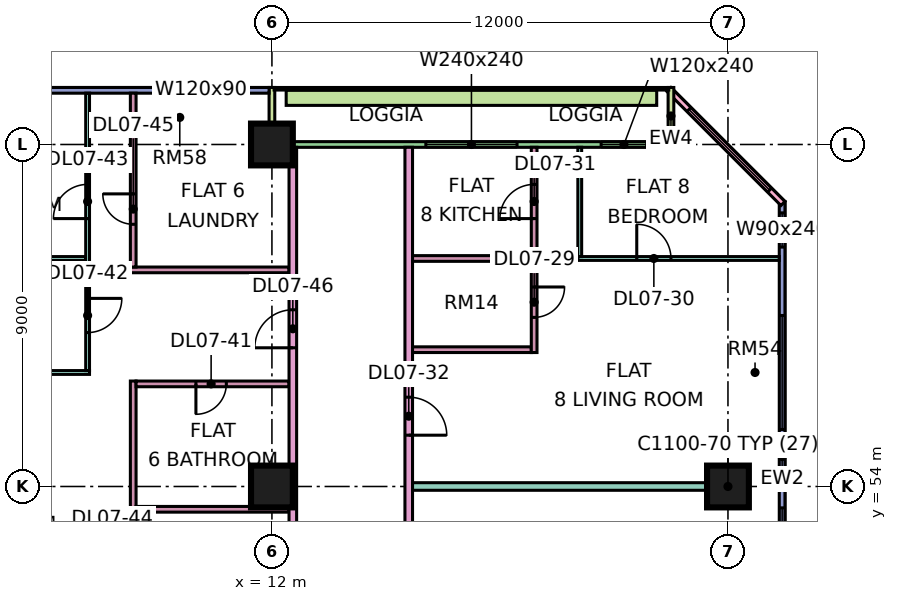
"""IFC4 building model, lengths in metres.
Left out: names, types, materials, properties, quantities, classifications, styles, units other than length and angle.
Written with IfcOpenShell. Run it as: python <this file> out.ifc"""

import sys

from ifc_helpers import new_model, si_unit, direction, frame, frame_2d, origin, origin_2d, place, context, subcontext, project, spatial, rectangle, extrude, element, fill, save


model = new_model("IFC4")
c1 = context("Model", 3, precision=1e-05, world=origin(), true_north=direction((0.0, 1.0)))
c2 = subcontext(c1, "Body", "Model", "MODEL_VIEW")
j1 = project(units=[si_unit("LENGTHUNIT", "METRE"), si_unit("PLANEANGLEUNIT", "RADIAN")], contexts=[c1])
p1 = place(None, origin())
s1 = spatial("IfcSite", under=j1, at=p1, CompositionType="ELEMENT")
p2 = place(p1, origin())
s2 = spatial("IfcBuilding", under=s1, at=p2, CompositionType="ELEMENT")
p3 = place(p2, frame((0.0, 0.0, 41.4)))
s3 = spatial("IfcBuildingStorey", under=s2, at=p3, CompositionType="ELEMENT", Elevation=41.4)
for number, where, z_axis, x_axis in (
    (1, (12.0, 54.0, 0.0), (0.0, 0.0, 1.0), (1.0, 0.0, 0.0)),
    (2, (12.0, 63.0, 0.0), (0.0, 0.0, 1.0), (1.0, 0.0, 0.0)),
    (3, (24.0, 54.0, 0.0), (0.0, 0.0, 1.0), (1.0, 0.0, 0.0)),
):
    element("IfcColumn", number, at=place(p3, frame(where, z_axis=z_axis, x_axis=x_axis)), inside=s3, PredefinedType="COLUMN", context=c2, shape_type="SweptSolid", body=[
        extrude(rectangle(XDim=1.1, YDim=1.1, at=origin_2d()), origin(), (0.0, 0.0, 1.0), 3.75),
    ])
p4 = place(p3, frame((25.425, 48.075, 0.0), z_axis=(0.0, 0.0, 1.0), x_axis=(0.0, 1.0, 0.0)))
e4 = element("IfcWall", 4, at=p4, inside=s3, PredefinedType="SOLIDWALL", context=c2, shape_type="SweptSolid", body=[
    extrude(rectangle(XDim=13.425, YDim=0.15, at=frame_2d((6.712, 0.0))), origin(), (0.0, 0.0, 1.0), 3.35),
])
p5 = place(p4, frame((0.562, 0.0, 0.45)))
e5 = element("IfcOpeningElement", 5, at=p5, cuts=e4, PredefinedType="OPENING", context=c2, shape_type="SweptSolid", body=[
    extrude(rectangle(XDim=4.8, YDim=2.4, at=frame_2d((2.4, 1.2))), frame((0.0, 0.085, 0.0), z_axis=(0.0, -1.0, 0.0), x_axis=(1.0, 0.0, 0.0)), (0.0, 0.0, 1.0), 0.17),
])
p6 = place(p4, frame((7.425, 0.0, 0.45)))
e6 = element("IfcOpeningElement", 6, at=p6, cuts=e4, PredefinedType="OPENING", context=c2, shape_type="SweptSolid", body=[
    extrude(rectangle(XDim=3.0, YDim=2.4, at=frame_2d((1.5, 1.2))), frame((0.0, 0.085, 0.0), z_axis=(0.0, -1.0, 0.0), x_axis=(1.0, 0.0, 0.0)), (0.0, 0.0, 1.0), 0.17),
])
p7 = place(p4, frame((12.225, 0.0, 0.45)))
e7 = element("IfcOpeningElement", 7, at=p7, cuts=e4, PredefinedType="OPENING", context=c2, shape_type="SweptSolid", body=[
    extrude(rectangle(XDim=0.9, YDim=2.4, at=frame_2d((0.45, 1.2))), frame((0.0, 0.085, 0.0), z_axis=(0.0, -1.0, 0.0), x_axis=(1.0, 0.0, 0.0)), (0.0, 0.0, 1.0), 0.17),
])
p8 = place(p3, frame((25.447, 61.447, 0.0), z_axis=(0.0, 0.0, 1.0), x_axis=(-0.707106781187, 0.707106781187, 0.0)))
e8 = element("IfcWall", 8, at=p8, inside=s3, PredefinedType="SOLIDWALL", context=c2, shape_type="SweptSolid", body=[
    extrude(rectangle(XDim=4.243, YDim=0.15, at=frame_2d((2.121, 0.0))), origin(), (0.0, 0.0, 1.0), 3.35),
])
p9 = place(p8, frame((0.498, 0.0, 0.45)))
e9 = element("IfcOpeningElement", 9, at=p9, cuts=e8, PredefinedType="OPENING", context=c2, shape_type="SweptSolid", body=[
    extrude(rectangle(XDim=3.0, YDim=2.4, at=frame_2d((1.5, 1.2))), frame((0.0, 0.085, 0.0), z_axis=(0.0, -1.0, 0.0), x_axis=(1.0, 0.0, 0.0)), (0.0, 0.0, 1.0), 0.17),
])
p10 = place(p3, frame((22.425, 63.0, 0.0), z_axis=(0.0, 0.0, 1.0), x_axis=(-1.0, 0.0, 0.0)))
e10 = element("IfcWall", 10, at=p10, inside=s3, PredefinedType="SOLIDWALL", context=c2, shape_type="SweptSolid", body=[
    extrude(rectangle(XDim=10.35, YDim=0.15, at=frame_2d((5.175, 0.0))), origin(), (0.0, 0.0, 1.0), 3.35),
])
p11 = place(p10, frame((0.562, 0.0, 0.45)))
e11 = element("IfcOpeningElement", 11, at=p11, cuts=e10, PredefinedType="OPENING", context=c2, shape_type="SweptSolid", body=[
    extrude(rectangle(XDim=1.2, YDim=2.4, at=frame_2d((0.6, 1.2))), frame((0.0, 0.085, 0.0), z_axis=(0.0, -1.0, 0.0), x_axis=(1.0, 0.0, 0.0)), (0.0, 0.0, 1.0), 0.17),
])
p12 = place(p10, frame((3.975, 0.0, 0.45)))
e12 = element("IfcOpeningElement", 12, at=p12, cuts=e10, PredefinedType="OPENING", context=c2, shape_type="SweptSolid", body=[
    extrude(rectangle(XDim=2.4, YDim=2.4, at=frame_2d((1.2, 1.2))), frame((0.0, 0.085, 0.0), z_axis=(0.0, -1.0, 0.0), x_axis=(1.0, 0.0, 0.0)), (0.0, 0.0, 1.0), 0.17),
])
for number, where, z_axis, x_axis in (
    (13, (22.5, 64.5, 0.0), (0.0, 0.0, 1.0), (0.0, -1.0, 0.0)),
    (14, (12.0, 64.5, 0.0), (0.0, 0.0, 1.0), (0.0, -1.0, 0.0)),
):
    element("IfcWall", number, at=place(p3, frame(where, z_axis=z_axis, x_axis=x_axis)), inside=s3, PredefinedType="SOLIDWALL", context=c2, shape_type="SweptSolid", body=[
        extrude(rectangle(XDim=1.5, YDim=0.15, at=frame_2d((0.75, 0.0))), origin(), (0.0, 0.0, 1.0), 3.35),
    ])
p13 = place(p3, frame((11.925, 64.425, 0.0), z_axis=(0.0, 0.0, 1.0), x_axis=(-1.0, 0.0, 0.0)))
e15 = element("IfcWall", 15, at=p13, inside=s3, PredefinedType="SOLIDWALL", context=c2, shape_type="SweptSolid", body=[
    extrude(rectangle(XDim=10.425, YDim=0.15, at=frame_2d((5.212, 0.0))), origin(), (0.0, 0.0, 1.0), 3.35),
])
p14 = place(p13, frame((1.188, 0.0, 1.7)))
e16 = element("IfcOpeningElement", 16, at=p14, cuts=e15, PredefinedType="OPENING", context=c2, shape_type="SweptSolid", body=[
    extrude(rectangle(XDim=1.2, YDim=0.9, at=frame_2d((0.6, 0.45))), frame((0.0, 0.085, 0.0), z_axis=(0.0, -1.0, 0.0), x_axis=(1.0, 0.0, 0.0)), (0.0, 0.0, 1.0), 0.17),
])
p15 = place(p13, frame((6.1, 0.0, 0.45)))
e17 = element("IfcOpeningElement", 17, at=p15, cuts=e15, PredefinedType="OPENING", context=c2, shape_type="SweptSolid", body=[
    extrude(rectangle(XDim=3.0, YDim=2.4, at=frame_2d((1.5, 1.2))), frame((0.0, 0.085, 0.0), z_axis=(0.0, -1.0, 0.0), x_axis=(1.0, 0.0, 0.0)), (0.0, 0.0, 1.0), 0.17),
])
p16 = place(p3, frame((22.125, 64.229, 0.0), z_axis=(0.0, 0.0, 1.0), x_axis=(-1.0, 0.0, 0.0)))
e18 = element("IfcWall", 18, at=p16, inside=s3, PredefinedType="SOLIDWALL", context=c2, shape_type="SweptSolid", body=[
    extrude(rectangle(XDim=9.75, YDim=0.4, at=frame_2d((4.875, 0.0))), origin(), (0.0, 0.0, 1.0), 0.7),
])
p17 = place(p3, frame((-1.351, 60.0, 0.0), z_axis=(0.0, 0.0, 1.0), x_axis=(1.0, 0.0, 0.0)))
e19 = element("IfcWall", 19, at=p17, inside=s3, PredefinedType="PARTITIONING", context=c2, shape_type="SweptSolid", body=[
    extrude(rectangle(XDim=8.451, YDim=0.1, at=frame_2d((4.226, 0.0))), origin(), (0.0, 0.0, 1.0), 3.35),
])
p18 = place(p3, frame((-1.35, 57.0, 0.0), z_axis=(0.0, 0.0, 1.0), x_axis=(1.0, 0.0, 0.0)))
e20 = element("IfcWall", 20, at=p18, inside=s3, PredefinedType="PARTITIONING", context=c2, shape_type="SweptSolid", body=[
    extrude(rectangle(XDim=8.55, YDim=0.1, at=frame_2d((4.275, 0.0))), origin(), (0.0, 0.0, 1.0), 3.35),
])
p19 = place(p3, frame((7.15, 57.05, 0.0), z_axis=(0.0, 0.0, 1.0), x_axis=(0.0, 1.0, 0.0)))
e21 = element("IfcWall", 21, at=p19, inside=s3, PredefinedType="PARTITIONING", context=c2, shape_type="SweptSolid", body=[
    extrude(rectangle(XDim=7.3, YDim=0.1, at=frame_2d((3.65, 0.0))), origin(), (0.0, 0.0, 1.0), 3.35),
])
p20 = place(p19, frame((1.0, 0.0, 0.0)))
e22 = element("IfcOpeningElement", 22, at=p20, cuts=e21, PredefinedType="OPENING", context=c2, shape_type="SweptSolid", body=[
    extrude(rectangle(XDim=0.9, YDim=2.1, at=frame_2d((0.45, 1.05))), frame((0.0, 0.06, 0.0), z_axis=(0.0, -1.0, 0.0), x_axis=(1.0, 0.0, 0.0)), (0.0, 0.0, 1.0), 0.12),
])
p21 = place(p19, frame((4.0, 0.0, 0.0)))
e23 = element("IfcOpeningElement", 23, at=p21, cuts=e21, PredefinedType="OPENING", context=c2, shape_type="SweptSolid", body=[
    extrude(rectangle(XDim=0.9, YDim=2.1, at=frame_2d((0.45, 1.05))), frame((0.0, 0.06, 0.0), z_axis=(0.0, -1.0, 0.0), x_axis=(1.0, 0.0, 0.0)), (0.0, 0.0, 1.0), 0.12),
])
p22 = place(p3, frame((8.275, 59.7, 0.0), z_axis=(0.0, 0.0, 1.0), x_axis=(1.0, 0.0, 0.0)))
e24 = element("IfcWall", 24, at=p22, inside=s3, PredefinedType="PARTITIONING", context=c2, shape_type="SweptSolid", body=[
    extrude(rectangle(XDim=4.175, YDim=0.15, at=frame_2d((2.087, 0.0))), origin(), (0.0, 0.0, 1.0), 3.35),
])
p23 = place(p3, frame((8.35, 51.1, 0.0), z_axis=(0.0, 0.0, 1.0), x_axis=(0.0, 1.0, 0.0)))
e25 = element("IfcWall", 25, at=p23, inside=s3, PredefinedType="PARTITIONING", context=c2, shape_type="SweptSolid", body=[
    extrude(rectangle(XDim=5.675, YDim=0.15, at=frame_2d((2.837, 0.0))), origin(), (0.0, 0.0, 1.0), 3.35),
])
p24 = place(p23, frame((0.65, 0.0, 0.0)))
e26 = element("IfcOpeningElement", 26, at=p24, cuts=e25, PredefinedType="OPENING", context=c2, shape_type="SweptSolid", body=[
    extrude(rectangle(XDim=0.9, YDim=2.1, at=frame_2d((0.45, 1.05))), frame((0.0, 0.085, 0.0), z_axis=(0.0, -1.0, 0.0), x_axis=(1.0, 0.0, 0.0)), (0.0, 0.0, 1.0), 0.17),
])
p25 = place(p3, frame((8.35, 59.775, 0.0), z_axis=(0.0, 0.0, 1.0), x_axis=(0.0, 1.0, 0.0)))
e27 = element("IfcWall", 27, at=p25, inside=s3, PredefinedType="PARTITIONING", context=c2, shape_type="SweptSolid", body=[
    extrude(rectangle(XDim=4.575, YDim=0.15, at=frame_2d((2.288, 0.0))), origin(), (0.0, 0.0, 1.0), 3.35),
])
p26 = place(p25, frame((1.125, 0.0, 0.0)))
e28 = element("IfcOpeningElement", 28, at=p26, cuts=e27, PredefinedType="OPENING", context=c2, shape_type="SweptSolid", body=[
    extrude(rectangle(XDim=0.8, YDim=2.1, at=frame_2d((0.4, 1.05))), frame((0.0, 0.085, 0.0), z_axis=(0.0, -1.0, 0.0), x_axis=(1.0, 0.0, 0.0)), (0.0, 0.0, 1.0), 0.17),
])
p27 = place(p3, frame((8.425, 53.4, 0.0), z_axis=(0.0, 0.0, 1.0), x_axis=(1.0, 0.0, 0.0)))
e29 = element("IfcWall", 29, at=p27, inside=s3, PredefinedType="PARTITIONING", context=c2, shape_type="SweptSolid", body=[
    extrude(rectangle(XDim=4.025, YDim=0.15, at=frame_2d((2.012, 0.0))), origin(), (0.0, 0.0, 1.0), 3.35),
])
p28 = place(p3, frame((8.425, 56.7, 0.0), z_axis=(0.0, 0.0, 1.0), x_axis=(1.0, 0.0, 0.0)))
e30 = element("IfcWall", 30, at=p28, inside=s3, PredefinedType="PARTITIONING", context=c2, shape_type="SweptSolid", body=[
    extrude(rectangle(XDim=4.025, YDim=0.15, at=frame_2d((2.012, 0.0))), origin(), (0.0, 0.0, 1.0), 3.35),
])
p29 = place(p28, frame((1.575, 0.0, 0.0)))
e31 = element("IfcOpeningElement", 31, at=p29, cuts=e30, PredefinedType="OPENING", context=c2, shape_type="SweptSolid", body=[
    extrude(rectangle(XDim=0.8, YDim=2.1, at=frame_2d((0.4, 1.05))), frame((0.0, 0.085, 0.0), z_axis=(0.0, -1.0, 0.0), x_axis=(1.0, 0.0, 0.0)), (0.0, 0.0, 1.0), 0.17),
])
p30 = place(p3, frame((12.55, 20.0, 0.0), z_axis=(0.0, 0.0, 1.0), x_axis=(0.0, 1.0, 0.0)))
e32 = element("IfcWall", 32, at=p30, inside=s3, PredefinedType="PARTITIONING", context=c2, shape_type="SweptSolid", body=[
    extrude(rectangle(XDim=42.926, YDim=0.2, at=frame_2d((21.463, 0.0))), origin(), (0.0, 0.0, 1.0), 3.35),
])
p31 = place(p30, frame((25.8, 0.0, 0.0)))
e33 = element("IfcOpeningElement", 33, at=p31, cuts=e32, PredefinedType="OPENING", context=c2, shape_type="SweptSolid", body=[
    extrude(rectangle(XDim=1.0, YDim=2.1, at=frame_2d((0.5, 1.05))), frame((0.0, 0.11, 0.0), z_axis=(0.0, -1.0, 0.0), x_axis=(1.0, 0.0, 0.0)), (0.0, 0.0, 1.0), 0.22),
])
p32 = place(p30, frame((37.65, 0.0, 0.0)))
e34 = element("IfcOpeningElement", 34, at=p32, cuts=e32, PredefinedType="OPENING", context=c2, shape_type="SweptSolid", body=[
    extrude(rectangle(XDim=1.0, YDim=2.1, at=frame_2d((0.5, 1.05))), frame((0.0, 0.11, 0.0), z_axis=(0.0, -1.0, 0.0), x_axis=(1.0, 0.0, 0.0)), (0.0, 0.0, 1.0), 0.22),
])
p33 = place(p30, frame((0.6, 0.0, 0.0)))
e35 = element("IfcOpeningElement", 35, at=p33, cuts=e32, PredefinedType="OPENING", context=c2, shape_type="SweptSolid", body=[
    extrude(rectangle(XDim=1.2, YDim=2.1, at=frame_2d((0.6, 1.05))), frame((0.0, 0.11, 0.0), z_axis=(0.0, -1.0, 0.0), x_axis=(1.0, 0.0, 0.0)), (0.0, 0.0, 1.0), 0.22),
])
p34 = place(p30, frame((4.65, 0.0, 0.0)))
e36 = element("IfcOpeningElement", 36, at=p34, cuts=e32, PredefinedType="OPENING", context=c2, shape_type="SweptSolid", body=[
    extrude(rectangle(XDim=1.0, YDim=2.1, at=frame_2d((0.5, 1.05))), frame((0.0, 0.11, 0.0), z_axis=(0.0, -1.0, 0.0), x_axis=(1.0, 0.0, 0.0)), (0.0, 0.0, 1.0), 0.22),
])
p35 = place(p3, frame((15.6, 51.225, 0.0), z_axis=(0.0, 0.0, 1.0), x_axis=(0.0, 1.0, 0.0)))
e37 = element("IfcWall", 37, at=p35, inside=s3, PredefinedType="PARTITIONING", context=c2, shape_type="SweptSolid", body=[
    extrude(rectangle(XDim=11.701, YDim=0.2, at=frame_2d((5.851, 0.0))), origin(), (0.0, 0.0, 1.0), 3.35),
])
p36 = place(p35, frame((4.125, 0.0, 0.0)))
e38 = element("IfcOpeningElement", 38, at=p36, cuts=e37, PredefinedType="OPENING", context=c2, shape_type="SweptSolid", body=[
    extrude(rectangle(XDim=1.0, YDim=2.1, at=frame_2d((0.5, 1.05))), frame((0.0, 0.11, 0.0), z_axis=(0.0, -1.0, 0.0), x_axis=(1.0, 0.0, 0.0)), (0.0, 0.0, 1.0), 0.22),
])
p37 = place(p3, frame((15.7, 54.0, 0.0), z_axis=(0.0, 0.0, 1.0), x_axis=(1.0, 0.0, 0.0)))
e39 = element("IfcWall", 39, at=p37, inside=s3, PredefinedType="PARTITIONING", context=c2, shape_type="SweptSolid", body=[
    extrude(rectangle(XDim=8.3, YDim=0.2, at=frame_2d((4.15, 0.0))), origin(), (0.0, 0.0, 1.0), 3.35),
])
for number, where, z_axis, x_axis in (
    (40, (15.7, 57.6, 0.0), (0.0, 0.0, 1.0), (1.0, 0.0, 0.0)),
    (41, (15.7, 60.0, 0.0), (0.0, 0.0, 1.0), (1.0, 0.0, 0.0)),
):
    element("IfcWall", number, at=place(p3, frame(where, z_axis=z_axis, x_axis=x_axis)), inside=s3, PredefinedType="PARTITIONING", context=c2, shape_type="SweptSolid", body=[
        extrude(rectangle(XDim=3.125, YDim=0.15, at=frame_2d((1.562, 0.0))), origin(), (0.0, 0.0, 1.0), 3.35),
    ])
p38 = place(p3, frame((18.9, 57.525, 0.0), z_axis=(0.0, 0.0, 1.0), x_axis=(0.0, 1.0, 0.0)))
e42 = element("IfcWall", 42, at=p38, inside=s3, PredefinedType="PARTITIONING", context=c2, shape_type="SweptSolid", body=[
    extrude(rectangle(XDim=5.401, YDim=0.15, at=frame_2d((2.701, 0.0))), origin(), (0.0, 0.0, 1.0), 3.35),
])
p39 = place(p38, frame((0.925, 0.0, 0.0)))
e43 = element("IfcOpeningElement", 43, at=p39, cuts=e42, PredefinedType="OPENING", context=c2, shape_type="SweptSolid", body=[
    extrude(rectangle(XDim=0.8, YDim=2.1, at=frame_2d((0.4, 1.05))), frame((0.0, 0.085, 0.0), z_axis=(0.0, -1.0, 0.0), x_axis=(1.0, 0.0, 0.0)), (0.0, 0.0, 1.0), 0.17),
])
p40 = place(p38, frame((3.525, 0.0, 0.0)))
e44 = element("IfcOpeningElement", 44, at=p40, cuts=e42, PredefinedType="OPENING", context=c2, shape_type="SweptSolid", body=[
    extrude(rectangle(XDim=0.9, YDim=2.1, at=frame_2d((0.45, 1.05))), frame((0.0, 0.085, 0.0), z_axis=(0.0, -1.0, 0.0), x_axis=(1.0, 0.0, 0.0)), (0.0, 0.0, 1.0), 0.17),
])
p41 = place(p3, frame((20.05, 60.0, 0.0), z_axis=(0.0, 0.0, 1.0), x_axis=(1.0, 0.0, 0.0)))
e45 = element("IfcWall", 45, at=p41, inside=s3, PredefinedType="PARTITIONING", context=c2, shape_type="SweptSolid", body=[
    extrude(rectangle(XDim=5.3, YDim=0.1, at=frame_2d((2.65, 0.0))), origin(), (0.0, 0.0, 1.0), 3.35),
])
p42 = place(p41, frame((1.55, 0.0, 0.0)))
e46 = element("IfcOpeningElement", 46, at=p42, cuts=e45, PredefinedType="OPENING", context=c2, shape_type="SweptSolid", body=[
    extrude(rectangle(XDim=0.9, YDim=2.1, at=frame_2d((0.45, 1.05))), frame((0.0, 0.06, 0.0), z_axis=(0.0, -1.0, 0.0), x_axis=(1.0, 0.0, 0.0)), (0.0, 0.0, 1.0), 0.12),
])
p43 = place(p3, frame((20.1, 60.05, 0.0), z_axis=(0.0, 0.0, 1.0), x_axis=(0.0, 1.0, 0.0)))
e47 = element("IfcWall", 47, at=p43, inside=s3, PredefinedType="PARTITIONING", context=c2, shape_type="SweptSolid", body=[
    extrude(rectangle(XDim=2.876, YDim=0.1, at=frame_2d((1.438, 0.0))), origin(), (0.0, 0.0, 1.0), 3.35),
])
p44 = place(p5, origin())
e48 = element("IfcWindow", 48, at=p44, inside=s3, PartitioningType="SINGLE_PANEL", PredefinedType="WINDOW", context=c2, shape_type="SweptSolid", body=[
    extrude(rectangle(XDim=4.8, YDim=2.4, at=frame_2d((2.4, 1.2))), frame((0.0, 0.03, 0.0), z_axis=(0.0, -1.0, 0.0), x_axis=(1.0, 0.0, 0.0)), (0.0, 0.0, 1.0), 0.06),
])
fill(e5, e48)
p45 = place(p6, origin())
e49 = element("IfcWindow", 49, at=p45, inside=s3, PartitioningType="SINGLE_PANEL", PredefinedType="WINDOW", context=c2, shape_type="SweptSolid", body=[
    extrude(rectangle(XDim=3.0, YDim=2.4, at=frame_2d((1.5, 1.2))), frame((0.0, 0.03, 0.0), z_axis=(0.0, -1.0, 0.0), x_axis=(1.0, 0.0, 0.0)), (0.0, 0.0, 1.0), 0.06),
])
fill(e6, e49)
p46 = place(p7, origin())
e50 = element("IfcWindow", 50, at=p46, inside=s3, PartitioningType="SINGLE_PANEL", PredefinedType="WINDOW", context=c2, shape_type="SweptSolid", body=[
    extrude(rectangle(XDim=0.9, YDim=2.4, at=frame_2d((0.45, 1.2))), frame((0.0, 0.03, 0.0), z_axis=(0.0, -1.0, 0.0), x_axis=(1.0, 0.0, 0.0)), (0.0, 0.0, 1.0), 0.06),
])
fill(e7, e50)
p47 = place(p9, origin())
e51 = element("IfcWindow", 51, at=p47, inside=s3, PartitioningType="SINGLE_PANEL", PredefinedType="WINDOW", context=c2, shape_type="SweptSolid", body=[
    extrude(rectangle(XDim=3.0, YDim=2.4, at=frame_2d((1.5, 1.2))), frame((0.0, 0.03, 0.0), z_axis=(0.0, -1.0, 0.0), x_axis=(1.0, 0.0, 0.0)), (0.0, 0.0, 1.0), 0.06),
])
fill(e9, e51)
p48 = place(p11, origin())
e52 = element("IfcWindow", 52, at=p48, inside=s3, PartitioningType="SINGLE_PANEL", PredefinedType="WINDOW", context=c2, shape_type="SweptSolid", body=[
    extrude(rectangle(XDim=1.2, YDim=2.4, at=frame_2d((0.6, 1.2))), frame((0.0, 0.03, 0.0), z_axis=(0.0, -1.0, 0.0), x_axis=(1.0, 0.0, 0.0)), (0.0, 0.0, 1.0), 0.06),
])
fill(e11, e52)
p49 = place(p12, origin())
e53 = element("IfcWindow", 53, at=p49, inside=s3, PartitioningType="SINGLE_PANEL", PredefinedType="WINDOW", context=c2, shape_type="SweptSolid", body=[
    extrude(rectangle(XDim=2.4, YDim=2.4, at=frame_2d((1.2, 1.2))), frame((0.0, 0.03, 0.0), z_axis=(0.0, -1.0, 0.0), x_axis=(1.0, 0.0, 0.0)), (0.0, 0.0, 1.0), 0.06),
])
fill(e12, e53)
p50 = place(p14, origin())
e54 = element("IfcWindow", 54, at=p50, inside=s3, PartitioningType="SINGLE_PANEL", PredefinedType="WINDOW", context=c2, shape_type="SweptSolid", body=[
    extrude(rectangle(XDim=1.2, YDim=0.9, at=frame_2d((0.6, 0.45))), frame((0.0, 0.03, 0.0), z_axis=(0.0, -1.0, 0.0), x_axis=(1.0, 0.0, 0.0)), (0.0, 0.0, 1.0), 0.06),
])
fill(e16, e54)
p51 = place(p39, origin())
e55 = element("IfcDoor", 55, at=p51, inside=s3, OperationType="SINGLE_SWING_RIGHT", PredefinedType="DOOR", context=c2, shape_type="SweptSolid", body=[
    extrude(rectangle(XDim=0.8, YDim=2.1, at=frame_2d((0.4, 1.05))), frame((0.0, 0.025, 0.0), z_axis=(0.0, -1.0, 0.0), x_axis=(1.0, 0.0, 0.0)), (0.0, 0.0, 1.0), 0.05),
])
fill(e43, e55)
p52 = place(p42, origin())
e56 = element("IfcDoor", 56, at=p52, inside=s3, OperationType="SINGLE_SWING_LEFT", PredefinedType="DOOR", context=c2, shape_type="SweptSolid", body=[
    extrude(rectangle(XDim=0.9, YDim=2.1, at=frame_2d((0.45, 1.05))), frame((0.0, 0.025, 0.0), z_axis=(0.0, -1.0, 0.0), x_axis=(1.0, 0.0, 0.0)), (0.0, 0.0, 1.0), 0.05),
])
fill(e46, e56)
p53 = place(p40, origin())
e57 = element("IfcDoor", 57, at=p53, inside=s3, OperationType="SINGLE_SWING_LEFT", PredefinedType="DOOR", context=c2, shape_type="SweptSolid", body=[
    extrude(rectangle(XDim=0.9, YDim=2.1, at=frame_2d((0.45, 1.05))), frame((0.0, 0.025, 0.0), z_axis=(0.0, -1.0, 0.0), x_axis=(1.0, 0.0, 0.0)), (0.0, 0.0, 1.0), 0.05),
])
fill(e44, e57)
p54 = place(p36, frame((1.0, 0.0, 0.0), z_axis=(0.0, 0.0, 1.0), x_axis=(-1.0, 0.0, 0.0)))
e58 = element("IfcDoor", 58, at=p54, inside=s3, OperationType="SINGLE_SWING_LEFT", PredefinedType="DOOR", context=c2, shape_type="SweptSolid", body=[
    extrude(rectangle(XDim=1.0, YDim=2.1, at=frame_2d((0.5, 1.05))), frame((0.0, 0.025, 0.0), z_axis=(0.0, -1.0, 0.0), x_axis=(1.0, 0.0, 0.0)), (0.0, 0.0, 1.0), 0.05),
])
fill(e38, e58)
p55 = place(p29, frame((0.8, 0.0, 0.0), z_axis=(0.0, 0.0, 1.0), x_axis=(-1.0, 0.0, 0.0)))
e59 = element("IfcDoor", 59, at=p55, inside=s3, OperationType="SINGLE_SWING_LEFT", PredefinedType="DOOR", context=c2, shape_type="SweptSolid", body=[
    extrude(rectangle(XDim=0.8, YDim=2.1, at=frame_2d((0.4, 1.05))), frame((0.0, 0.025, 0.0), z_axis=(0.0, -1.0, 0.0), x_axis=(1.0, 0.0, 0.0)), (0.0, 0.0, 1.0), 0.05),
])
fill(e31, e59)
p56 = place(p20, origin())
e60 = element("IfcDoor", 60, at=p56, inside=s3, OperationType="SINGLE_SWING_RIGHT", PredefinedType="DOOR", context=c2, shape_type="SweptSolid", body=[
    extrude(rectangle(XDim=0.9, YDim=2.1, at=frame_2d((0.45, 1.05))), frame((0.0, 0.025, 0.0), z_axis=(0.0, -1.0, 0.0), x_axis=(1.0, 0.0, 0.0)), (0.0, 0.0, 1.0), 0.05),
])
fill(e22, e60)
p57 = place(p21, origin())
e61 = element("IfcDoor", 61, at=p57, inside=s3, OperationType="SINGLE_SWING_LEFT", PredefinedType="DOOR", context=c2, shape_type="SweptSolid", body=[
    extrude(rectangle(XDim=0.9, YDim=2.1, at=frame_2d((0.45, 1.05))), frame((0.0, 0.025, 0.0), z_axis=(0.0, -1.0, 0.0), x_axis=(1.0, 0.0, 0.0)), (0.0, 0.0, 1.0), 0.05),
])
fill(e23, e61)
p58 = place(p26, frame((0.8, 0.0, 0.0), z_axis=(0.0, 0.0, 1.0), x_axis=(-1.0, 0.0, 0.0)))
e62 = element("IfcDoor", 62, at=p58, inside=s3, OperationType="SINGLE_SWING_RIGHT", PredefinedType="DOOR", context=c2, shape_type="SweptSolid", body=[
    extrude(rectangle(XDim=0.8, YDim=2.1, at=frame_2d((0.4, 1.05))), frame((0.0, 0.025, 0.0), z_axis=(0.0, -1.0, 0.0), x_axis=(1.0, 0.0, 0.0)), (0.0, 0.0, 1.0), 0.05),
])
fill(e28, e62)
p59 = place(p32, origin())
e63 = element("IfcDoor", 63, at=p59, inside=s3, OperationType="SINGLE_SWING_LEFT", PredefinedType="DOOR", context=c2, shape_type="SweptSolid", body=[
    extrude(rectangle(XDim=1.0, YDim=2.1, at=frame_2d((0.5, 1.05))), frame((0.0, 0.025, 0.0), z_axis=(0.0, -1.0, 0.0), x_axis=(1.0, 0.0, 0.0)), (0.0, 0.0, 1.0), 0.05),
])
fill(e34, e63)
save(model, sys.argv[1])
